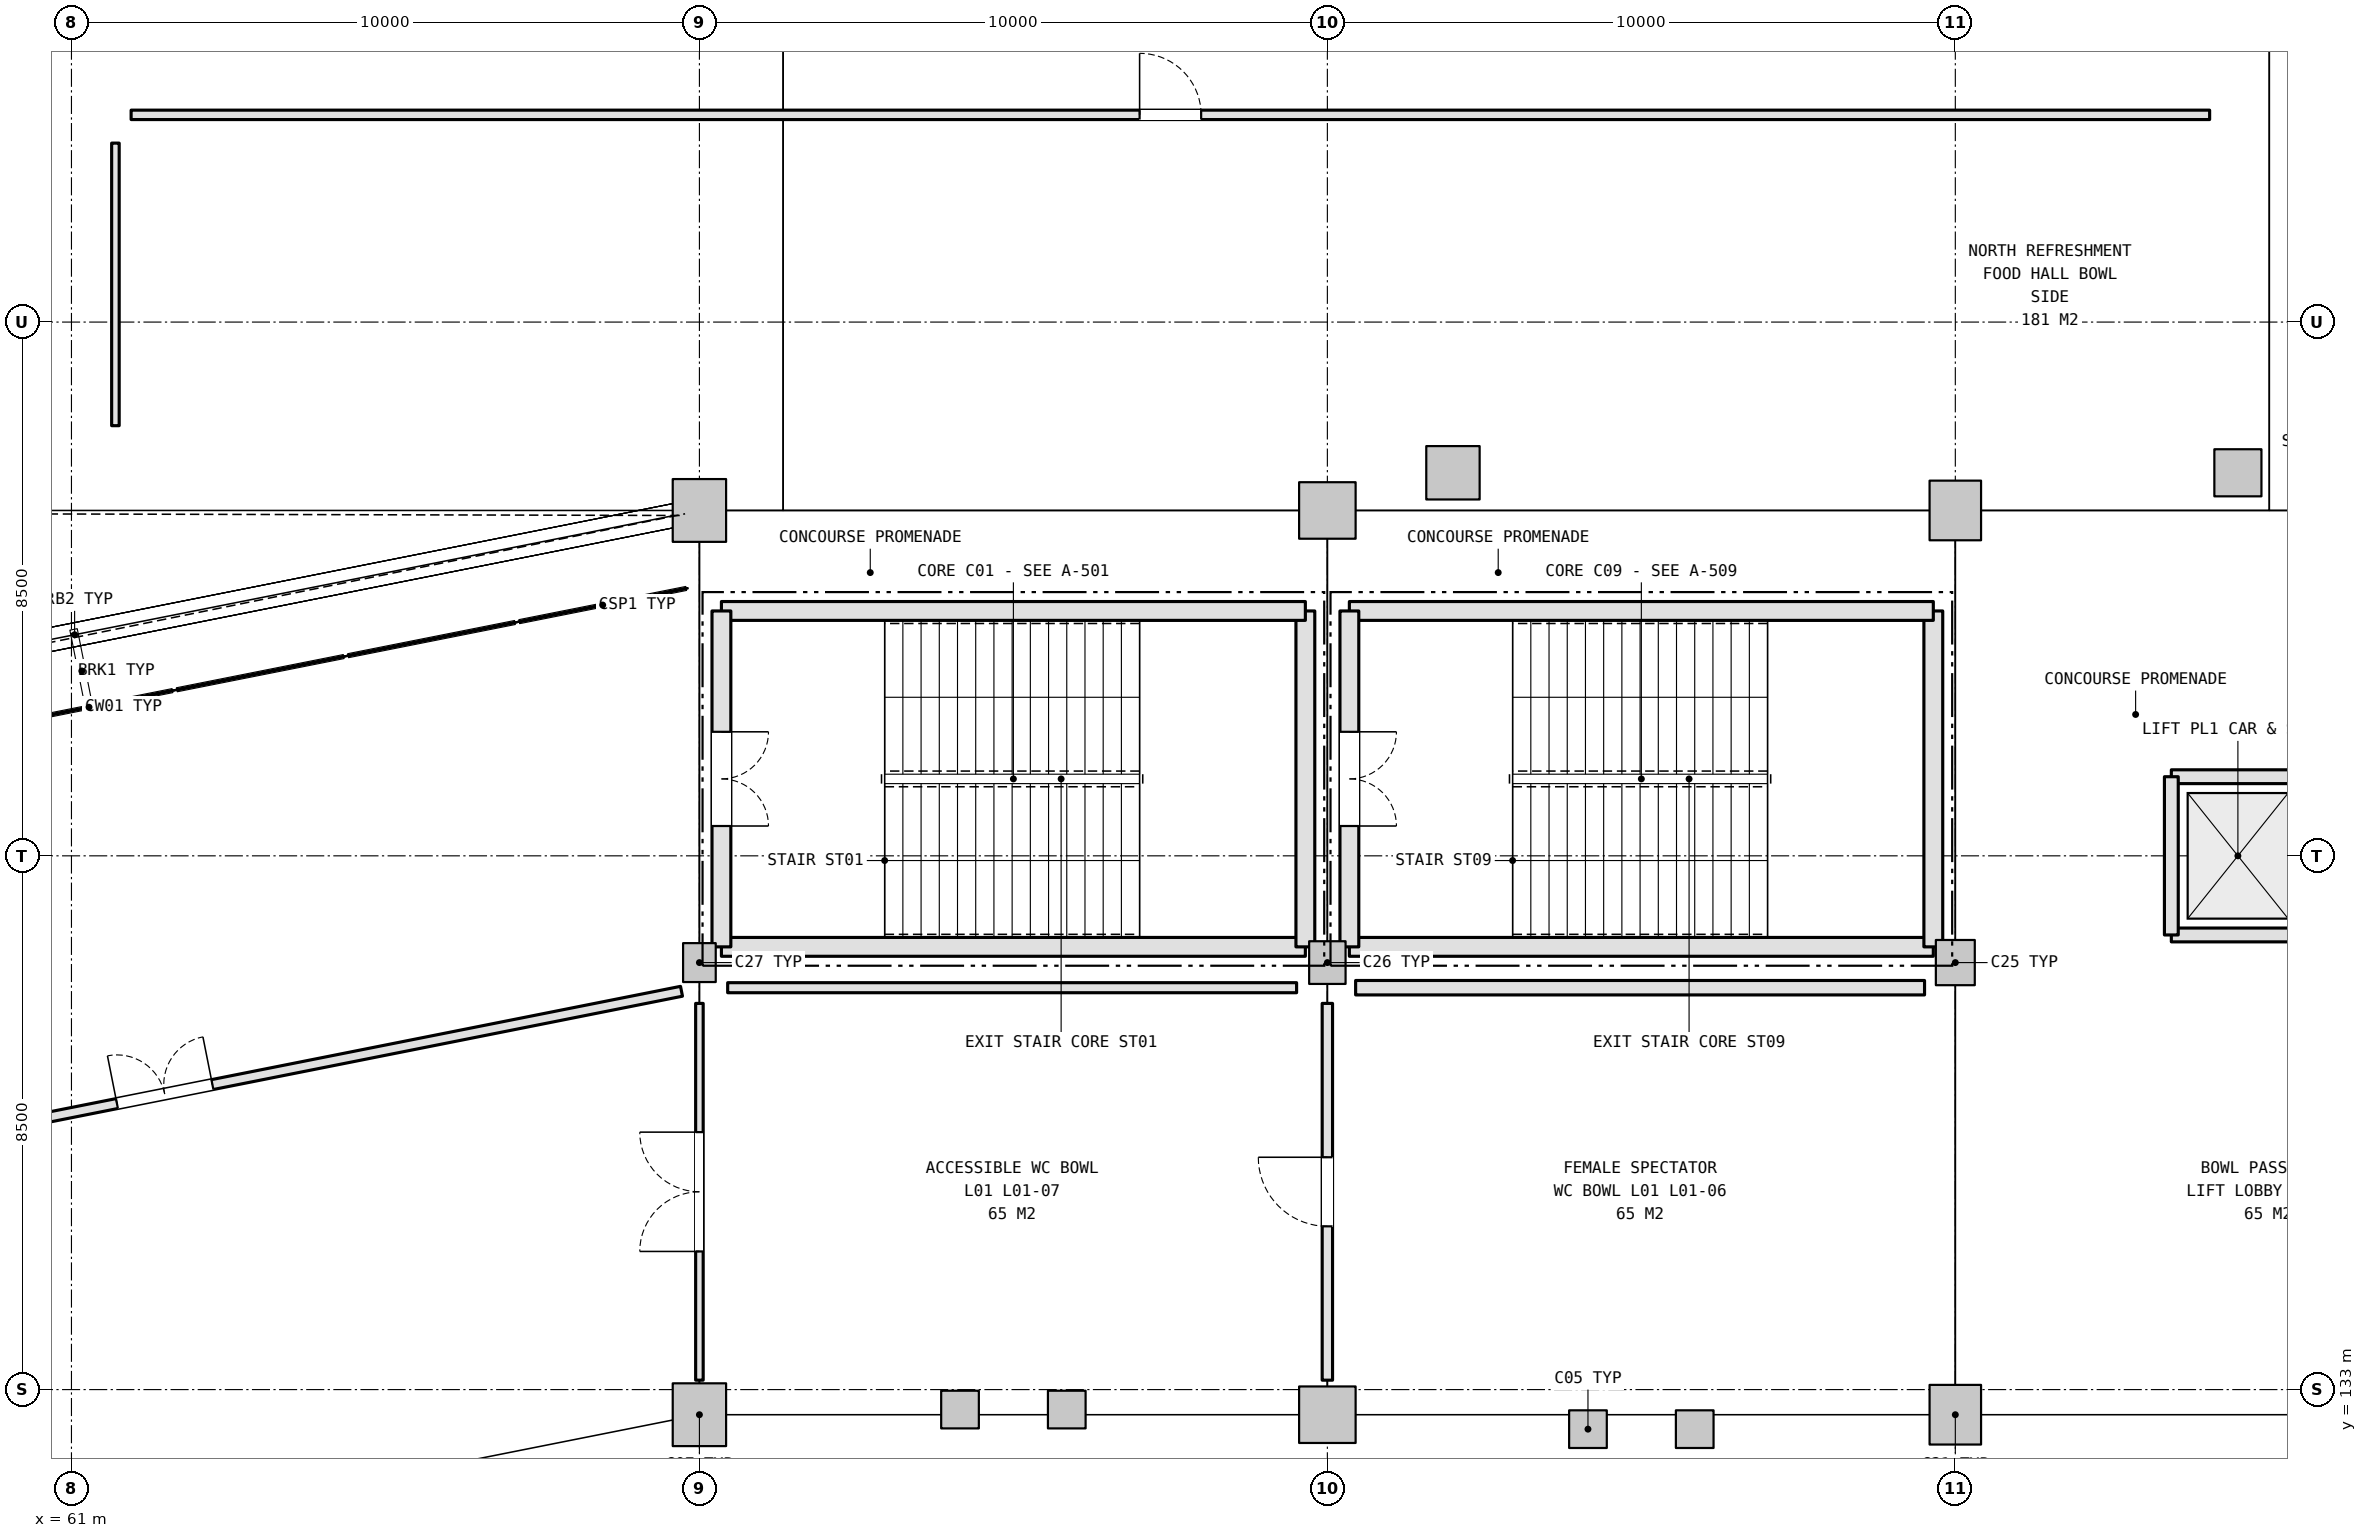
"""IFC4 building model, lengths in metres.
Left out: names, types, materials, properties, quantities, classifications, styles, units other than length and angle.
Written with IfcOpenShell. Run it as: python <this file> out.ifc"""

import sys

from ifc_helpers import new_model, si_unit, direction, frame, frame_2d, origin, origin_2d, place, context, subcontext, project, spatial, rectangle, extrude, element, fill, save


model = new_model("IFC4")
c1 = context("Model", 3, precision=1e-05, world=origin(), true_north=direction((0.0, 1.0)))
c2 = subcontext(c1, "Body", "Model", "MODEL_VIEW")
j1 = project(units=[si_unit("LENGTHUNIT", "METRE"), si_unit("PLANEANGLEUNIT", "RADIAN")], contexts=[c1])
p1 = place(None, origin())
s1 = spatial("IfcSite", under=j1, at=p1, CompositionType="ELEMENT")
p2 = place(p1, origin())
s2 = spatial("IfcBuilding", under=s1, at=p2, CompositionType="ELEMENT")
p3 = place(p2, frame((0.0, 0.0, 5.4)))
s3 = spatial("IfcBuildingStorey", under=s2, at=p3, CompositionType="ELEMENT", Elevation=5.4)
p4 = place(p3, frame((91.0, 132.6, 0.0), z_axis=(0.0, 0.0, 1.0), x_axis=(1.0, 0.0, 0.0)))
e1 = element("IfcColumn", 1, at=p4, inside=s3, PredefinedType="COLUMN", context=c2, shape_type="SweptSolid", body=[
    extrude(rectangle(XDim=0.82, YDim=0.95, at=origin_2d()), origin(), (0.0, 0.0, 1.0), 5.4),
])
p5 = place(p3, frame((91.0, 139.8, 0.0), z_axis=(0.0, 0.0, 1.0), x_axis=(1.0, 0.0, 0.0)))
e2 = element("IfcColumn", 2, at=p5, inside=s3, PredefinedType="COLUMN", context=c2, shape_type="SweptSolid", body=[
    extrude(rectangle(XDim=0.62, YDim=0.72, at=origin_2d()), origin(), (0.0, 0.0, 1.0), 5.4),
])
p6 = place(p3, frame((91.0, 147.0, 0.0), z_axis=(0.0, 0.0, 1.0), x_axis=(1.0, 0.0, 0.0)))
e3 = element("IfcColumn", 3, at=p6, inside=s3, PredefinedType="COLUMN", context=c2, shape_type="SweptSolid", body=[
    extrude(rectangle(XDim=0.82, YDim=0.95, at=origin_2d()), origin(), (0.0, 0.0, 1.0), 5.4),
])
p7 = place(p3, frame((81.0, 132.6, 0.0), z_axis=(0.0, 0.0, 1.0), x_axis=(1.0, 0.0, 0.0)))
e4 = element("IfcColumn", 4, at=p7, inside=s3, PredefinedType="COLUMN", context=c2, shape_type="SweptSolid", body=[
    extrude(rectangle(XDim=0.9, YDim=0.9, at=origin_2d()), origin(), (0.0, 0.0, 1.0), 5.4),
])
p8 = place(p3, frame((81.0, 139.8, 0.0), z_axis=(0.0, 0.0, 1.0), x_axis=(1.0, 0.0, 0.0)))
e5 = element("IfcColumn", 5, at=p8, inside=s3, PredefinedType="COLUMN", context=c2, shape_type="SweptSolid", body=[
    extrude(rectangle(XDim=0.58, YDim=0.68, at=origin_2d()), origin(), (0.0, 0.0, 1.0), 5.4),
])
p9 = place(p3, frame((81.0, 147.0, 0.0), z_axis=(0.0, 0.0, 1.0), x_axis=(1.0, 0.0, 0.0)))
e6 = element("IfcColumn", 6, at=p9, inside=s3, PredefinedType="COLUMN", context=c2, shape_type="SweptSolid", body=[
    extrude(rectangle(XDim=0.9, YDim=0.9, at=origin_2d()), origin(), (0.0, 0.0, 1.0), 5.4),
])
p10 = place(p3, frame((71.0, 132.6, 0.0), z_axis=(0.0, 0.0, 1.0), x_axis=(1.0, 0.0, 0.0)))
e7 = element("IfcColumn", 7, at=p10, inside=s3, PredefinedType="COLUMN", context=c2, shape_type="SweptSolid", body=[
    extrude(rectangle(XDim=0.85, YDim=1.0, at=origin_2d()), origin(), (0.0, 0.0, 1.0), 5.4),
])
p11 = place(p3, frame((71.0, 139.8, 0.0), z_axis=(0.0, 0.0, 1.0), x_axis=(1.0, 0.0, 0.0)))
e8 = element("IfcColumn", 8, at=p11, inside=s3, PredefinedType="COLUMN", context=c2, shape_type="SweptSolid", body=[
    extrude(rectangle(XDim=0.52, YDim=0.62, at=origin_2d()), origin(), (0.0, 0.0, 1.0), 5.4),
])
p12 = place(p3, frame((71.0, 147.0, 0.0), z_axis=(0.0, 0.0, 1.0), x_axis=(1.0, 0.0, 0.0)))
e9 = element("IfcColumn", 9, at=p12, inside=s3, PredefinedType="COLUMN", context=c2, shape_type="SweptSolid", body=[
    extrude(rectangle(XDim=0.85, YDim=1.0, at=origin_2d()), origin(), (0.0, 0.0, 1.0), 5.4),
])
p13 = place(p3, frame((83.0, 147.6, 0.0), z_axis=(0.0, 0.0, 1.0), x_axis=(1.0, 0.0, 0.0)))
e10 = element("IfcColumn", 10, at=p13, inside=s3, PredefinedType="COLUMN", context=c2, shape_type="SweptSolid", body=[
    extrude(rectangle(XDim=0.85, YDim=0.85, at=origin_2d()), origin(), (0.0, 0.0, 1.0), 5.4),
])
p14 = place(p3, frame((95.5, 147.6, 0.0), z_axis=(0.0, 0.0, 1.0), x_axis=(1.0, 0.0, 0.0)))
e11 = element("IfcColumn", 11, at=p14, inside=s3, PredefinedType="COLUMN", context=c2, shape_type="SweptSolid", body=[
    extrude(rectangle(XDim=0.75, YDim=0.75, at=origin_2d()), origin(), (0.0, 0.0, 1.0), 5.4),
])
p15 = place(p3, frame((71.35, 140.05, 0.0), z_axis=(0.0, 0.0, 1.0), x_axis=(1.0, 0.0, 0.0)))
e12 = element("IfcWall", 12, at=p15, inside=s3, PredefinedType="SHEAR", context=c2, shape_type="SweptSolid", body=[
    extrude(rectangle(XDim=9.299, YDim=0.3, at=frame_2d((4.65, 0.0))), origin(), (0.0, 0.0, 1.0), 5.14),
])
p16 = place(p3, frame((80.65, 140.05, 0.0), z_axis=(0.0, 0.0, 1.0), x_axis=(0.0, 1.0, 0.0)))
e13 = element("IfcWall", 13, at=p16, inside=s3, PredefinedType="SHEAR", context=c2, shape_type="SweptSolid", body=[
    extrude(rectangle(XDim=5.349, YDim=0.3, at=frame_2d((2.675, 0.0))), origin(), (0.0, 0.0, 1.0), 5.14),
])
p17 = place(p3, frame((80.65, 145.4, 0.0), z_axis=(0.0, 0.0, 1.0), x_axis=(-1.0, 0.0, 0.0)))
e14 = element("IfcWall", 14, at=p17, inside=s3, PredefinedType="SHEAR", context=c2, shape_type="SweptSolid", body=[
    extrude(rectangle(XDim=9.299, YDim=0.3, at=frame_2d((4.65, 0.0))), origin(), (0.0, 0.0, 1.0), 5.14),
])
p18 = place(p3, frame((71.35, 145.4, 0.0), z_axis=(0.0, 0.0, 1.0), x_axis=(0.0, -1.0, 0.0)))
e15 = element("IfcWall", 15, at=p18, inside=s3, PredefinedType="SHEAR", context=c2, shape_type="SweptSolid", body=[
    extrude(rectangle(XDim=5.349, YDim=0.3, at=frame_2d((2.675, 0.0))), origin(), (0.0, 0.0, 1.0), 5.14),
])
p19 = place(p18, frame((1.925, 0.0, 0.0)))
e16 = element("IfcOpeningElement", 16, at=p19, cuts=e15, PredefinedType="OPENING", context=c2, shape_type="SweptSolid", body=[
    extrude(rectangle(XDim=1.5, YDim=2.2, at=frame_2d((0.75, 1.1))), frame((0.0, 0.16, 0.0), z_axis=(0.0, -1.0, 0.0), x_axis=(1.0, 0.0, 0.0)), (0.0, 0.0, 1.0), 0.32),
])
p20 = place(p3, frame((81.35, 140.05, 0.0), z_axis=(0.0, 0.0, 1.0), x_axis=(1.0, 0.0, 0.0)))
e17 = element("IfcWall", 17, at=p20, inside=s3, PredefinedType="SHEAR", context=c2, shape_type="SweptSolid", body=[
    extrude(rectangle(XDim=9.299, YDim=0.3, at=frame_2d((4.65, 0.0))), origin(), (0.0, 0.0, 1.0), 5.14),
])
p21 = place(p3, frame((90.65, 140.05, 0.0), z_axis=(0.0, 0.0, 1.0), x_axis=(0.0, 1.0, 0.0)))
e18 = element("IfcWall", 18, at=p21, inside=s3, PredefinedType="SHEAR", context=c2, shape_type="SweptSolid", body=[
    extrude(rectangle(XDim=5.349, YDim=0.3, at=frame_2d((2.675, 0.0))), origin(), (0.0, 0.0, 1.0), 5.14),
])
p22 = place(p3, frame((90.65, 145.4, 0.0), z_axis=(0.0, 0.0, 1.0), x_axis=(-1.0, 0.0, 0.0)))
e19 = element("IfcWall", 19, at=p22, inside=s3, PredefinedType="SHEAR", context=c2, shape_type="SweptSolid", body=[
    extrude(rectangle(XDim=9.299, YDim=0.3, at=frame_2d((4.65, 0.0))), origin(), (0.0, 0.0, 1.0), 5.14),
])
p23 = place(p3, frame((81.35, 145.4, 0.0), z_axis=(0.0, 0.0, 1.0), x_axis=(0.0, -1.0, 0.0)))
e20 = element("IfcWall", 20, at=p23, inside=s3, PredefinedType="SHEAR", context=c2, shape_type="SweptSolid", body=[
    extrude(rectangle(XDim=5.349, YDim=0.3, at=frame_2d((2.675, 0.0))), origin(), (0.0, 0.0, 1.0), 5.14),
])
p24 = place(p23, frame((1.925, 0.0, 0.0)))
e21 = element("IfcOpeningElement", 21, at=p24, cuts=e20, PredefinedType="OPENING", context=c2, shape_type="SweptSolid", body=[
    extrude(rectangle(XDim=1.5, YDim=2.2, at=frame_2d((0.75, 1.1))), frame((0.0, 0.16, 0.0), z_axis=(0.0, -1.0, 0.0), x_axis=(1.0, 0.0, 0.0)), (0.0, 0.0, 1.0), 0.32),
])
for number, where, z_axis, x_axis in (
    (22, (85.15, 132.37, 0.0), (0.0, 0.0, 1.0), (1.0, 0.0, 0.0)),
    (23, (86.85, 132.37, 0.0), (0.0, 0.0, 1.0), (1.0, 0.0, 0.0)),
    (24, (75.15, 132.682, 0.0), (0.0, 0.0, 1.0), (1.0, 0.0, 0.0)),
    (25, (76.85, 132.682, 0.0), (0.0, 0.0, 1.0), (1.0, 0.0, 0.0)),
):
    element("IfcColumn", number, at=place(p3, frame(where, z_axis=z_axis, x_axis=x_axis)), inside=s3, PredefinedType="COLUMN", context=c2, shape_type="SweptSolid", body=[
        extrude(rectangle(XDim=0.6, YDim=0.6, at=origin_2d()), origin(), (0.0, 0.0, 1.0), 5.4),
    ])
for number, where, z_axis, x_axis in (
    (26, (94.44, 140.24, 0.0), (0.0, 0.0, 1.0), (1.0, 0.0, 0.0)),
    (27, (96.56, 142.76, 0.0), (0.0, 0.0, 1.0), (-1.0, 0.0, 0.0)),
):
    element("IfcWall", number, at=place(p3, frame(where, z_axis=z_axis, x_axis=x_axis)), inside=s3, PredefinedType="SHEAR", context=c2, shape_type="SweptSolid", body=[
        extrude(rectangle(XDim=2.12, YDim=0.22, at=frame_2d((1.06, 0.0))), origin(), (0.0, 0.0, 1.0), 5.14),
    ])
p25 = place(p3, frame((94.44, 142.76, 0.0), z_axis=(0.0, 0.0, 1.0), x_axis=(0.0, -1.0, 0.0)))
e28 = element("IfcWall", 28, at=p25, inside=s3, PredefinedType="SHEAR", context=c2, shape_type="SweptSolid", body=[
    extrude(rectangle(XDim=2.52, YDim=0.22, at=frame_2d((1.26, 0.0))), origin(), (0.0, 0.0, 1.0), 5.14),
])
p26 = place(p3, frame((61.95, 153.3, 0.0), z_axis=(0.0, 0.0, 1.0), x_axis=(1.0, 0.0, 0.0)))
e29 = element("IfcWall", 29, at=p26, inside=s3, PredefinedType="PARTITIONING", context=c2, shape_type="SweptSolid", body=[
    extrude(rectangle(XDim=33.1, YDim=0.15, at=frame_2d((16.55, 0.0))), origin(), (0.0, 0.0, 1.0), 4.525),
])
p27 = place(p26, frame((16.06, 0.0, 0.0)))
e30 = element("IfcOpeningElement", 30, at=p27, cuts=e29, PredefinedType="OPENING", context=c2, shape_type="SweptSolid", body=[
    extrude(rectangle(XDim=0.98, YDim=2.15, at=frame_2d((0.49, 1.075))), frame((0.0, 0.085, 0.0), z_axis=(0.0, -1.0, 0.0), x_axis=(1.0, 0.0, 0.0)), (0.0, 0.0, 1.0), 0.17),
])
p28 = place(p3, frame((61.7, 148.35, 0.0), z_axis=(0.0, 0.0, 1.0), x_axis=(0.0, 1.0, 0.0)))
e31 = element("IfcWall", 31, at=p28, inside=s3, PredefinedType="PARTITIONING", context=c2, shape_type="SweptSolid", body=[
    extrude(rectangle(XDim=4.5, YDim=0.12, at=frame_2d((2.25, 0.0))), origin(), (0.0, 0.0, 1.0), 4.675),
])
p29 = place(p3, frame((81.0, 133.15, 0.0), z_axis=(0.0, 0.0, 1.0), x_axis=(0.0, 1.0, 0.0)))
e32 = element("IfcWall", 32, at=p29, inside=s3, PredefinedType="PARTITIONING", context=c2, shape_type="SweptSolid", body=[
    extrude(rectangle(XDim=6.0, YDim=0.165, at=frame_2d((3.0, 0.0))), origin(), (0.0, 0.0, 1.0), 4.345),
])
p30 = place(p29, frame((2.45, 0.0, 0.0)))
e33 = element("IfcOpeningElement", 33, at=p30, cuts=e32, PredefinedType="OPENING", context=c2, shape_type="SweptSolid", body=[
    extrude(rectangle(XDim=1.1, YDim=2.15, at=frame_2d((0.55, 1.075))), frame((0.0, 0.093, 0.0), z_axis=(0.0, -1.0, 0.0), x_axis=(1.0, 0.0, 0.0)), (0.0, 0.0, 1.0), 0.185),
])
p31 = place(p3, frame((81.45, 139.4, 0.0), z_axis=(0.0, 0.0, 1.0), x_axis=(1.0, 0.0, 0.0)))
e34 = element("IfcWall", 34, at=p31, inside=s3, PredefinedType="PLUMBINGWALL", context=c2, shape_type="SweptSolid", body=[
    extrude(rectangle(XDim=9.06, YDim=0.23, at=frame_2d((4.53, 0.0))), origin(), (0.0, 0.0, 1.0), 5.12),
])
p32 = place(p3, frame((71.0, 133.15, 0.0), z_axis=(0.0, 0.0, 1.0), x_axis=(0.0, 1.0, 0.0)))
e35 = element("IfcWall", 35, at=p32, inside=s3, PredefinedType="PARTITIONING", context=c2, shape_type="SweptSolid", body=[
    extrude(rectangle(XDim=6.0, YDim=0.12, at=frame_2d((3.0, 0.0))), origin(), (0.0, 0.0, 1.0), 4.375),
])
p33 = place(p32, frame((2.05, 0.0, 0.0)))
e36 = element("IfcOpeningElement", 36, at=p33, cuts=e35, PredefinedType="OPENING", context=c2, shape_type="SweptSolid", body=[
    extrude(rectangle(XDim=1.9, YDim=2.3, at=frame_2d((0.95, 1.15))), frame((0.0, 0.07, 0.0), z_axis=(0.0, -1.0, 0.0), x_axis=(1.0, 0.0, 0.0)), (0.0, 0.0, 1.0), 0.14),
])
p34 = place(p3, frame((71.45, 139.4, 0.0), z_axis=(0.0, 0.0, 1.0), x_axis=(1.0, 0.0, 0.0)))
e37 = element("IfcWall", 37, at=p34, inside=s3, PredefinedType="PARTITIONING", context=c2, shape_type="SweptSolid", body=[
    extrude(rectangle(XDim=9.06, YDim=0.16, at=frame_2d((4.53, 0.0))), origin(), (0.0, 0.0, 1.0), 5.12),
])
p35 = place(p3, frame((54.254, 136.069, 0.0), z_axis=(0.0, 0.0, 1.0), x_axis=(0.980786027867, 0.195086564225, 0.0)))
e38 = element("IfcWall", 38, at=p35, inside=s3, PredefinedType="PARTITIONING", context=c2, shape_type="SweptSolid", body=[
    extrude(rectangle(XDim=16.783, YDim=0.16, at=frame_2d((8.392, 0.0))), origin(), (0.0, 0.0, 1.0), 4.375),
])
p36 = place(p35, frame((7.617, 0.0, 0.0)))
e39 = element("IfcOpeningElement", 39, at=p36, cuts=e38, PredefinedType="OPENING", context=c2, shape_type="SweptSolid", body=[
    extrude(rectangle(XDim=1.55, YDim=2.15, at=frame_2d((0.775, 1.075))), frame((0.0, 0.09, 0.0), z_axis=(0.0, -1.0, 0.0), x_axis=(1.0, 0.0, 0.0)), (0.0, 0.0, 1.0), 0.18),
])
p37 = place(p19, origin())
e40 = element("IfcDoor", 40, at=p37, inside=s3, OperationType="DOUBLE_DOOR_SINGLE_SWING", PredefinedType="DOOR", context=c2, shape_type="SweptSolid", body=[
    extrude(rectangle(XDim=1.5, YDim=2.2, at=frame_2d((0.75, 1.1))), frame((0.0, 0.025, 0.0), z_axis=(0.0, -1.0, 0.0), x_axis=(1.0, 0.0, 0.0)), (0.0, 0.0, 1.0), 0.05),
])
fill(e16, e40)
p38 = place(p24, origin())
e41 = element("IfcDoor", 41, at=p38, inside=s3, OperationType="DOUBLE_DOOR_SINGLE_SWING", PredefinedType="DOOR", context=c2, shape_type="SweptSolid", body=[
    extrude(rectangle(XDim=1.5, YDim=2.2, at=frame_2d((0.75, 1.1))), frame((0.0, 0.025, 0.0), z_axis=(0.0, -1.0, 0.0), x_axis=(1.0, 0.0, 0.0)), (0.0, 0.0, 1.0), 0.05),
])
fill(e21, e41)
p39 = place(p27, origin())
e42 = element("IfcDoor", 42, at=p39, inside=s3, OperationType="SINGLE_SWING_LEFT", PredefinedType="DOOR", context=c2, shape_type="SweptSolid", body=[
    extrude(rectangle(XDim=0.98, YDim=2.15, at=frame_2d((0.49, 1.075))), frame((0.0, 0.025, 0.0), z_axis=(0.0, -1.0, 0.0), x_axis=(1.0, 0.0, 0.0)), (0.0, 0.0, 1.0), 0.05),
])
fill(e30, e42)
p40 = place(p30, origin())
e43 = element("IfcDoor", 43, at=p40, inside=s3, OperationType="SINGLE_SWING_RIGHT", PredefinedType="DOOR", context=c2, shape_type="SweptSolid", body=[
    extrude(rectangle(XDim=1.1, YDim=2.15, at=frame_2d((0.55, 1.075))), frame((0.0, 0.025, 0.0), z_axis=(0.0, -1.0, 0.0), x_axis=(1.0, 0.0, 0.0)), (0.0, 0.0, 1.0), 0.05),
])
fill(e33, e43)
p41 = place(p33, origin())
e44 = element("IfcDoor", 44, at=p41, inside=s3, OperationType="DOUBLE_DOOR_SINGLE_SWING", PredefinedType="DOOR", context=c2, shape_type="SweptSolid", body=[
    extrude(rectangle(XDim=1.9, YDim=2.3, at=frame_2d((0.95, 1.15))), frame((0.0, 0.025, 0.0), z_axis=(0.0, -1.0, 0.0), x_axis=(1.0, 0.0, 0.0)), (0.0, 0.0, 1.0), 0.05),
])
fill(e36, e44)
p42 = place(p36, origin())
e45 = element("IfcDoor", 45, at=p42, inside=s3, OperationType="DOUBLE_DOOR_SINGLE_SWING", PredefinedType="DOOR", context=c2, shape_type="SweptSolid", body=[
    extrude(rectangle(XDim=1.55, YDim=2.15, at=frame_2d((0.775, 1.075))), frame((0.0, 0.025, 0.0), z_axis=(0.0, -1.0, 0.0), x_axis=(1.0, 0.0, 0.0)), (0.0, 0.0, 1.0), 0.05),
])
fill(e39, e45)
save(model, sys.argv[1])
